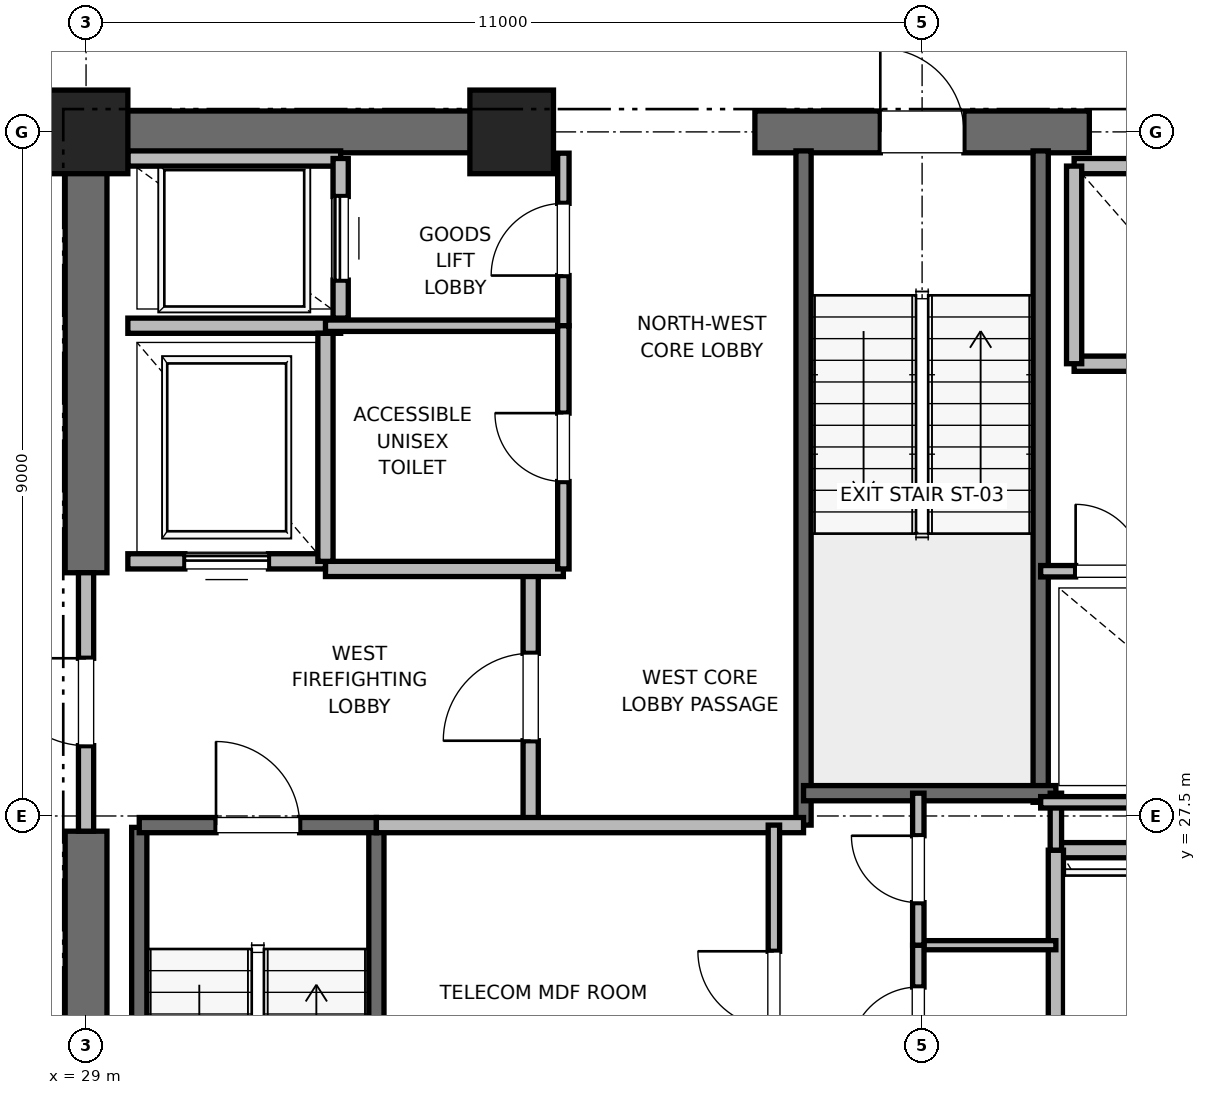
"""IFC4 building model, lengths in metres.
Left out: names, types, materials, properties, quantities, classifications, styles, units other than length and angle.
Written with IfcOpenShell. Run it as: python <this file> out.ifc"""

import sys

from ifc_helpers import new_model, si_unit, direction, frame, frame_2d, origin, origin_2d, place, context, subcontext, project, spatial, rectangle, extrude, element, fill, save


model = new_model("IFC4")
c1 = context("Model", 3, precision=1e-05, world=origin(), true_north=direction((0.0, 1.0)))
c2 = subcontext(c1, "Body", "Model", "MODEL_VIEW")
j1 = project(units=[si_unit("LENGTHUNIT", "METRE"), si_unit("PLANEANGLEUNIT", "RADIAN")], contexts=[c1])
p1 = place(None, origin())
s1 = spatial("IfcSite", under=j1, at=p1, CompositionType="ELEMENT")
p2 = place(p1, origin())
s2 = spatial("IfcBuilding", under=s1, at=p2, CompositionType="ELEMENT")
p3 = place(p2, frame((0.0, 0.0, 180.4)))
s3 = spatial("IfcBuildingStorey", under=s2, at=p3, CompositionType="ELEMENT", Elevation=180.4)
for number, where, z_axis, x_axis in (
    (1, (29.0, 36.5, 0.0), (0.0, 0.0, 1.0), (1.0, 0.0, 0.0)),
    (2, (34.6, 36.5, 0.0), (0.0, 0.0, 1.0), (1.0, 0.0, 0.0)),
):
    element("IfcColumn", number, at=place(p3, frame(where, z_axis=z_axis, x_axis=x_axis)), inside=s3, PredefinedType="PILASTER", context=c2, shape_type="SweptSolid", body=[
        extrude(rectangle(XDim=1.1, YDim=1.1, at=origin_2d()), origin(), (0.0, 0.0, 1.0), 4.0),
    ])
p4 = place(p3, frame((29.0, 36.5, 0.0), z_axis=(0.0, 0.0, 1.0), x_axis=(1.0, 0.0, 0.0)))
e3 = element("IfcWall", 3, at=p4, inside=s3, PredefinedType="SHEAR", context=c2, shape_type="SweptSolid", body=[
    extrude(rectangle(XDim=5.8, YDim=0.55, at=frame_2d((2.9, 0.0))), origin(), (0.0, 0.0, 1.0), 3.7),
])
p5 = place(p3, frame((37.8, 36.5, 0.0), z_axis=(0.0, 0.0, 1.0), x_axis=(1.0, 0.0, 0.0)))
e4 = element("IfcWall", 4, at=p5, inside=s3, PredefinedType="SHEAR", context=c2, shape_type="SweptSolid", body=[
    extrude(rectangle(XDim=4.4, YDim=0.55, at=frame_2d((2.2, 0.0))), origin(), (0.0, 0.0, 1.0), 3.7),
])
p6 = place(p5, frame((1.65, 0.0, 0.0)))
e5 = element("IfcOpeningElement", 5, at=p6, cuts=e4, PredefinedType="OPENING", context=c2, shape_type="SweptSolid", body=[
    extrude(rectangle(XDim=1.1, YDim=2.15, at=frame_2d((0.55, 1.075))), frame((0.0, 0.275, 0.0), z_axis=(0.0, -1.0, 0.0), x_axis=(1.0, 0.0, 0.0)), (0.0, 0.0, 1.0), 0.55),
])
p7 = place(p3, frame((29.0, 18.5, 0.0), z_axis=(0.0, 0.0, 1.0), x_axis=(0.0, 1.0, 0.0)))
e6 = element("IfcWall", 6, at=p7, inside=s3, PredefinedType="SHEAR", context=c2, shape_type="SweptSolid", body=[
    extrude(rectangle(XDim=8.8, YDim=0.55, at=frame_2d((4.4, 0.0))), origin(), (0.0, 0.0, 1.0), 3.7),
])
p8 = place(p3, frame((29.0, 30.7, 0.0), z_axis=(0.0, 0.0, 1.0), x_axis=(0.0, 1.0, 0.0)))
e7 = element("IfcWall", 7, at=p8, inside=s3, PredefinedType="SHEAR", context=c2, shape_type="SweptSolid", body=[
    extrude(rectangle(XDim=5.8, YDim=0.55, at=frame_2d((2.9, 0.0))), origin(), (0.0, 0.0, 1.0), 3.7),
])
p9 = place(p3, frame((29.7, 19.2, 0.0), z_axis=(0.0, 0.0, 1.0), x_axis=(0.0, 1.0, 0.0)))
e8 = element("IfcWall", 8, at=p9, inside=s3, PredefinedType="SOLIDWALL", context=c2, shape_type="SweptSolid", body=[
    extrude(rectangle(XDim=8.15, YDim=0.2, at=frame_2d((4.075, 0.0))), origin(), (0.0, 0.0, 1.0), 3.7),
])
p10 = place(p3, frame((32.82, 18.6, 0.0), z_axis=(0.0, 0.0, 1.0), x_axis=(0.0, 1.0, 0.0)))
e9 = element("IfcWall", 9, at=p10, inside=s3, PredefinedType="SOLIDWALL", context=c2, shape_type="SweptSolid", body=[
    extrude(rectangle(XDim=8.78, YDim=0.2, at=frame_2d((4.39, 0.0))), origin(), (0.0, 0.0, 1.0), 3.7),
])
p11 = place(p3, frame((29.7, 27.38, 0.0), z_axis=(0.0, 0.0, 1.0), x_axis=(1.0, 0.0, 0.0)))
e10 = element("IfcWall", 10, at=p11, inside=s3, PredefinedType="SOLIDWALL", context=c2, shape_type="SweptSolid", body=[
    extrude(rectangle(XDim=3.12, YDim=0.2, at=frame_2d((1.56, 0.0))), origin(), (0.0, 0.0, 1.0), 3.7),
])
p12 = place(p11, frame((1.01, 0.0, 0.0)))
e11 = element("IfcOpeningElement", 11, at=p12, cuts=e10, PredefinedType="OPENING", context=c2, shape_type="SweptSolid", body=[
    extrude(rectangle(XDim=1.1, YDim=2.15, at=frame_2d((0.55, 1.075))), frame((0.0, 0.1, 0.0), z_axis=(0.0, -1.0, 0.0), x_axis=(1.0, 0.0, 0.0)), (0.0, 0.0, 1.0), 0.2),
])
p13 = place(p3, frame((38.44, 27.38, 0.0), z_axis=(0.0, 0.0, 1.0), x_axis=(0.0, 1.0, 0.0)))
e12 = element("IfcWall", 12, at=p13, inside=s3, PredefinedType="SOLIDWALL", context=c2, shape_type="SweptSolid", body=[
    extrude(rectangle(XDim=8.87, YDim=0.2, at=frame_2d((4.435, 0.0))), origin(), (0.0, 0.0, 1.0), 3.7),
])
p14 = place(p3, frame((41.56, 27.68, 0.0), z_axis=(0.0, 0.0, 1.0), x_axis=(0.0, 1.0, 0.0)))
e13 = element("IfcWall", 13, at=p14, inside=s3, PredefinedType="SOLIDWALL", context=c2, shape_type="SweptSolid", body=[
    extrude(rectangle(XDim=8.57, YDim=0.2, at=frame_2d((4.285, 0.0))), origin(), (0.0, 0.0, 1.0), 3.7),
])
p15 = place(p3, frame((38.44, 27.8, 0.0), z_axis=(0.0, 0.0, 1.0), x_axis=(1.0, 0.0, 0.0)))
e14 = element("IfcWall", 14, at=p15, inside=s3, PredefinedType="SOLIDWALL", context=c2, shape_type="SweptSolid", body=[
    extrude(rectangle(XDim=3.32, YDim=0.2, at=frame_2d((1.66, 0.0))), origin(), (0.0, 0.0, 1.0), 3.7),
])
p16 = place(p3, frame((34.85, 27.38, 0.0), z_axis=(0.0, 0.0, 1.0), x_axis=(0.0, 1.0, 0.0)))
e15 = element("IfcWall", 15, at=p16, inside=s3, PredefinedType="PARTITIONING", context=c2, shape_type="SweptSolid", body=[
    extrude(rectangle(XDim=3.37, YDim=0.2, at=frame_2d((1.685, 0.0))), origin(), (0.0, 0.0, 1.0), 3.7),
])
p17 = place(p16, frame((1.11, 0.0, 0.0)))
e16 = element("IfcOpeningElement", 16, at=p17, cuts=e15, PredefinedType="OPENING", context=c2, shape_type="SweptSolid", body=[
    extrude(rectangle(XDim=1.15, YDim=2.2, at=frame_2d((0.575, 1.1))), frame((0.0, 0.1, 0.0), z_axis=(0.0, -1.0, 0.0), x_axis=(1.0, 0.0, 0.0)), (0.0, 0.0, 1.0), 0.2),
])
p18 = place(p3, frame((29.0, 27.3, 0.0), z_axis=(0.0, 0.0, 1.0), x_axis=(0.0, 1.0, 0.0)))
e17 = element("IfcWall", 17, at=p18, inside=s3, PredefinedType="PARTITIONING", context=c2, shape_type="SweptSolid", body=[
    extrude(rectangle(XDim=3.4, YDim=0.2, at=frame_2d((1.7, 0.0))), origin(), (0.0, 0.0, 1.0), 2.68),
])
p19 = place(p18, frame((1.125, 0.0, 0.0)))
e18 = element("IfcOpeningElement", 18, at=p19, cuts=e17, PredefinedType="OPENING", context=c2, shape_type="SweptSolid", body=[
    extrude(rectangle(XDim=1.15, YDim=2.2, at=frame_2d((0.575, 1.1))), frame((0.0, 0.1, 0.0), z_axis=(0.0, -1.0, 0.0), x_axis=(1.0, 0.0, 0.0)), (0.0, 0.0, 1.0), 0.2),
])
p20 = place(p3, frame((32.82, 27.38, 0.0), z_axis=(0.0, 0.0, 1.0), x_axis=(1.0, 0.0, 0.0)))
e19 = element("IfcWall", 19, at=p20, inside=s3, PredefinedType="PARTITIONING", context=c2, shape_type="SweptSolid", body=[
    extrude(rectangle(XDim=5.62, YDim=0.2, at=frame_2d((2.81, 0.0))), origin(), (0.0, 0.0, 1.0), 3.7),
])
p21 = place(p3, frame((32.15, 30.75, 0.0), z_axis=(0.0, 0.0, 1.0), x_axis=(1.0, 0.0, 0.0)))
e20 = element("IfcWall", 20, at=p21, inside=s3, PredefinedType="PARTITIONING", context=c2, shape_type="SweptSolid", body=[
    extrude(rectangle(XDim=3.13, YDim=0.2, at=frame_2d((1.565, 0.0))), origin(), (0.0, 0.0, 1.0), 3.7),
])
p22 = place(p3, frame((29.55, 30.85, 0.0), z_axis=(0.0, 0.0, 1.0), x_axis=(1.0, 0.0, 0.0)))
e21 = element("IfcWall", 21, at=p22, inside=s3, PredefinedType="SOLIDWALL", context=c2, shape_type="SweptSolid", body=[
    extrude(rectangle(XDim=2.6, YDim=0.2, at=frame_2d((1.3, 0.0))), origin(), (0.0, 0.0, 1.0), 2.68),
])
p23 = place(p22, frame((0.75, 0.0, 0.0)))
e22 = element("IfcOpeningElement", 22, at=p23, cuts=e21, PredefinedType="OPENING", context=c2, shape_type="SweptSolid", body=[
    extrude(rectangle(XDim=1.1, YDim=2.2, at=frame_2d((0.55, 1.1))), frame((0.0, 0.1, 0.0), z_axis=(0.0, -1.0, 0.0), x_axis=(1.0, 0.0, 0.0)), (0.0, 0.0, 1.0), 0.2),
])
p24 = place(p3, frame((29.55, 33.95, 0.0), z_axis=(0.0, 0.0, 1.0), x_axis=(1.0, 0.0, 0.0)))
e23 = element("IfcWall", 23, at=p24, inside=s3, PredefinedType="SOLIDWALL", context=c2, shape_type="SweptSolid", body=[
    extrude(rectangle(XDim=2.8, YDim=0.2, at=frame_2d((1.4, 0.0))), origin(), (0.0, 0.0, 1.0), 3.7),
])
p25 = place(p3, frame((32.15, 30.85, 0.0), z_axis=(0.0, 0.0, 1.0), x_axis=(0.0, 1.0, 0.0)))
e24 = element("IfcWall", 24, at=p25, inside=s3, PredefinedType="SOLIDWALL", context=c2, shape_type="SweptSolid", body=[
    extrude(rectangle(XDim=3.0, YDim=0.2, at=frame_2d((1.5, 0.0))), origin(), (0.0, 0.0, 1.0), 3.7),
])
p26 = place(p3, frame((32.35, 36.15, 0.0), z_axis=(0.0, 0.0, 1.0), x_axis=(-1.0, 0.0, 0.0)))
e25 = element("IfcWall", 25, at=p26, inside=s3, PredefinedType="SOLIDWALL", context=c2, shape_type="SweptSolid", body=[
    extrude(rectangle(XDim=2.8, YDim=0.2, at=frame_2d((1.4, 0.0))), origin(), (0.0, 0.0, 1.0), 2.91),
])
p27 = place(p3, frame((32.35, 34.05, 0.0), z_axis=(0.0, 0.0, 1.0), x_axis=(0.0, 1.0, 0.0)))
e26 = element("IfcWall", 26, at=p27, inside=s3, PredefinedType="SOLIDWALL", context=c2, shape_type="SweptSolid", body=[
    extrude(rectangle(XDim=2.1, YDim=0.2, at=frame_2d((1.05, 0.0))), origin(), (0.0, 0.0, 1.0), 3.7),
])
p28 = place(p27, frame((0.5, 0.0, 0.0)))
e27 = element("IfcOpeningElement", 27, at=p28, cuts=e26, PredefinedType="OPENING", context=c2, shape_type="SweptSolid", body=[
    extrude(rectangle(XDim=1.1, YDim=2.2, at=frame_2d((0.55, 1.1))), frame((0.0, 0.1, 0.0), z_axis=(0.0, -1.0, 0.0), x_axis=(1.0, 0.0, 0.0)), (0.0, 0.0, 1.0), 0.2),
])
p29 = place(p3, frame((43.44, 27.05, 0.0), z_axis=(0.0, 0.0, 1.0), x_axis=(-1.0, 0.0, 0.0)))
e28 = element("IfcWall", 28, at=p29, inside=s3, PredefinedType="SOLIDWALL", context=c2, shape_type="SweptSolid", body=[
    extrude(rectangle(XDim=1.68, YDim=0.2, at=frame_2d((0.84, 0.0))), origin(), (0.0, 0.0, 1.0), 3.7),
])
p30 = place(p3, frame((41.76, 27.05, 0.0), z_axis=(0.0, 0.0, 1.0), x_axis=(0.0, -1.0, 0.0)))
e29 = element("IfcWall", 29, at=p30, inside=s3, PredefinedType="SOLIDWALL", context=c2, shape_type="SweptSolid", body=[
    extrude(rectangle(XDim=2.6, YDim=0.2, at=frame_2d((1.3, 0.0))), origin(), (0.0, 0.0, 1.0), 3.7),
])
p31 = place(p3, frame((42.0, 33.45, 0.0), z_axis=(0.0, 0.0, 1.0), x_axis=(1.0, 0.0, 0.0)))
e30 = element("IfcWall", 30, at=p31, inside=s3, PredefinedType="SOLIDWALL", context=c2, shape_type="SweptSolid", body=[
    extrude(rectangle(XDim=2.3, YDim=0.2, at=frame_2d((1.15, 0.0))), origin(), (0.0, 0.0, 1.0), 3.7),
])
p32 = place(p3, frame((44.3, 36.05, 0.0), z_axis=(0.0, 0.0, 1.0), x_axis=(-1.0, 0.0, 0.0)))
e31 = element("IfcWall", 31, at=p32, inside=s3, PredefinedType="SOLIDWALL", context=c2, shape_type="SweptSolid", body=[
    extrude(rectangle(XDim=2.3, YDim=0.2, at=frame_2d((1.15, 0.0))), origin(), (0.0, 0.0, 1.0), 2.68),
])
p33 = place(p3, frame((42.0, 36.05, 0.0), z_axis=(0.0, 0.0, 1.0), x_axis=(0.0, -1.0, 0.0)))
e32 = element("IfcWall", 32, at=p33, inside=s3, PredefinedType="SOLIDWALL", context=c2, shape_type="SweptSolid", body=[
    extrude(rectangle(XDim=2.6, YDim=0.2, at=frame_2d((1.3, 0.0))), origin(), (0.0, 0.0, 1.0), 2.68),
])
p34 = place(p3, frame((39.95, 25.8, 0.0), z_axis=(0.0, 0.0, 1.0), x_axis=(1.0, 0.0, 0.0)))
e33 = element("IfcWall", 33, at=p34, inside=s3, PredefinedType="PARTITIONING", context=c2, shape_type="SweptSolid", body=[
    extrude(rectangle(XDim=1.81, YDim=0.12, at=frame_2d((0.905, 0.0))), origin(), (0.0, 0.0, 1.0), 2.85),
])
p35 = place(p3, frame((41.76, 27.05, 0.0), z_axis=(0.0, 0.0, 1.0), x_axis=(0.0, 1.0, 0.0)))
e34 = element("IfcWall", 34, at=p35, inside=s3, PredefinedType="PARTITIONING", context=c2, shape_type="SweptSolid", body=[
    extrude(rectangle(XDim=0.75, YDim=0.15, at=frame_2d((0.375, 0.0))), origin(), (0.0, 0.0, 1.0), 2.85),
])
p36 = place(p3, frame((39.95, 23.8, 0.0), z_axis=(0.0, 0.0, 1.0), x_axis=(0.0, 1.0, 0.0)))
e35 = element("IfcWall", 35, at=p36, inside=s3, PredefinedType="PARTITIONING", context=c2, shape_type="SweptSolid", body=[
    extrude(rectangle(XDim=2.0, YDim=0.15, at=frame_2d((1.0, 0.0))), origin(), (0.0, 0.0, 1.0), 2.85),
])
p37 = place(p36, frame((0.55, 0.0, 0.0)))
e36 = element("IfcOpeningElement", 36, at=p37, cuts=e35, PredefinedType="OPENING", context=c2, shape_type="SweptSolid", body=[
    extrude(rectangle(XDim=0.9, YDim=2.1, at=frame_2d((0.45, 1.05))), frame((0.0, 0.075, 0.0), z_axis=(0.0, -1.0, 0.0), x_axis=(1.0, 0.0, 0.0)), (0.0, 0.0, 1.0), 0.15),
])
p38 = place(p3, frame((39.95, 25.8, 0.0), z_axis=(0.0, 0.0, 1.0), x_axis=(0.0, 1.0, 0.0)))
e37 = element("IfcWall", 37, at=p38, inside=s3, PredefinedType="PARTITIONING", context=c2, shape_type="SweptSolid", body=[
    extrude(rectangle(XDim=2.0, YDim=0.15, at=frame_2d((1.0, 0.0))), origin(), (0.0, 0.0, 1.0), 2.85),
])
p39 = place(p38, frame((0.56, 0.0, 0.0)))
e38 = element("IfcOpeningElement", 38, at=p39, cuts=e37, PredefinedType="OPENING", context=c2, shape_type="SweptSolid", body=[
    extrude(rectangle(XDim=0.88, YDim=2.1, at=frame_2d((0.44, 1.05))), frame((0.0, 0.075, 0.0), z_axis=(0.0, -1.0, 0.0), x_axis=(1.0, 0.0, 0.0)), (0.0, 0.0, 1.0), 0.15),
])
p40 = place(p3, frame((32.15, 33.95, 0.0), z_axis=(0.0, 0.0, 1.0), x_axis=(1.0, 0.0, 0.0)))
e39 = element("IfcWall", 39, at=p40, inside=s3, PredefinedType="PARTITIONING", context=c2, shape_type="SweptSolid", body=[
    extrude(rectangle(XDim=3.13, YDim=0.15, at=frame_2d((1.565, 0.0))), origin(), (0.0, 0.0, 1.0), 2.85),
])
p41 = place(p3, frame((35.28, 33.95, 0.0), z_axis=(0.0, 0.0, 1.0), x_axis=(0.0, 1.0, 0.0)))
e40 = element("IfcWall", 40, at=p41, inside=s3, PredefinedType="PARTITIONING", context=c2, shape_type="SweptSolid", body=[
    extrude(rectangle(XDim=2.27, YDim=0.15, at=frame_2d((1.135, 0.0))), origin(), (0.0, 0.0, 1.0), 2.68),
])
p42 = place(p41, frame((0.66, 0.0, 0.0)))
e41 = element("IfcOpeningElement", 41, at=p42, cuts=e40, PredefinedType="OPENING", context=c2, shape_type="SweptSolid", body=[
    extrude(rectangle(XDim=0.95, YDim=2.15, at=frame_2d((0.475, 1.075))), frame((0.0, 0.075, 0.0), z_axis=(0.0, -1.0, 0.0), x_axis=(1.0, 0.0, 0.0)), (0.0, 0.0, 1.0), 0.15),
])
p43 = place(p3, frame((35.28, 30.75, 0.0), z_axis=(0.0, 0.0, 1.0), x_axis=(0.0, 1.0, 0.0)))
e42 = element("IfcWall", 42, at=p43, inside=s3, PredefinedType="PARTITIONING", context=c2, shape_type="SweptSolid", body=[
    extrude(rectangle(XDim=3.2, YDim=0.15, at=frame_2d((1.6, 0.0))), origin(), (0.0, 0.0, 1.0), 2.85),
])
p44 = place(p43, frame((1.15, 0.0, 0.0)))
e43 = element("IfcOpeningElement", 43, at=p44, cuts=e42, PredefinedType="OPENING", context=c2, shape_type="SweptSolid", body=[
    extrude(rectangle(XDim=0.9, YDim=2.1, at=frame_2d((0.45, 1.05))), frame((0.0, 0.075, 0.0), z_axis=(0.0, -1.0, 0.0), x_axis=(1.0, 0.0, 0.0)), (0.0, 0.0, 1.0), 0.15),
])
p45 = place(p3, frame((38.05, 23.06, 0.0), z_axis=(0.0, 0.0, 1.0), x_axis=(0.0, 1.0, 0.0)))
e44 = element("IfcWall", 44, at=p45, inside=s3, PredefinedType="PARTITIONING", context=c2, shape_type="SweptSolid", body=[
    extrude(rectangle(XDim=4.32, YDim=0.15, at=frame_2d((2.16, 0.0))), origin(), (0.0, 0.0, 1.0), 2.85),
])
p46 = place(p45, frame((1.66, 0.0, 0.0)))
e45 = element("IfcOpeningElement", 45, at=p46, cuts=e44, PredefinedType="OPENING", context=c2, shape_type="SweptSolid", body=[
    extrude(rectangle(XDim=1.0, YDim=2.15, at=frame_2d((0.5, 1.075))), frame((0.0, 0.075, 0.0), z_axis=(0.0, -1.0, 0.0), x_axis=(1.0, 0.0, 0.0)), (0.0, 0.0, 1.0), 0.15),
])
p47 = place(p3, frame((41.56, 27.68, 0.0), z_axis=(0.0, 0.0, 1.0), x_axis=(1.0, 0.0, 0.0)))
e46 = element("IfcWall", 46, at=p47, inside=s3, PredefinedType="PARTITIONING", context=c2, shape_type="SweptSolid", body=[
    extrude(rectangle(XDim=3.59, YDim=0.15, at=frame_2d((1.795, 0.0))), origin(), (0.0, 0.0, 1.0), 2.85),
])
p48 = place(p3, frame((41.56, 30.72, 0.0), z_axis=(0.0, 0.0, 1.0), x_axis=(1.0, 0.0, 0.0)))
e47 = element("IfcWall", 47, at=p48, inside=s3, PredefinedType="PARTITIONING", context=c2, shape_type="SweptSolid", body=[
    extrude(rectangle(XDim=1.8, YDim=0.15, at=frame_2d((0.9, 0.0))), origin(), (0.0, 0.0, 1.0), 2.85),
])
p49 = place(p48, frame((0.46, 0.0, 0.0)))
e48 = element("IfcOpeningElement", 48, at=p49, cuts=e47, PredefinedType="OPENING", context=c2, shape_type="SweptSolid", body=[
    extrude(rectangle(XDim=0.88, YDim=2.1, at=frame_2d((0.44, 1.05))), frame((0.0, 0.075, 0.0), z_axis=(0.0, -1.0, 0.0), x_axis=(1.0, 0.0, 0.0)), (0.0, 0.0, 1.0), 0.15),
])
p50 = place(p12, origin())
e49 = element("IfcDoor", 49, at=p50, inside=s3, OperationType="SINGLE_SWING_LEFT", PredefinedType="DOOR", context=c2, shape_type="SweptSolid", body=[
    extrude(rectangle(XDim=1.1, YDim=2.15, at=frame_2d((0.55, 1.075))), frame((0.0, 0.025, 0.0), z_axis=(0.0, -1.0, 0.0), x_axis=(1.0, 0.0, 0.0)), (0.0, 0.0, 1.0), 0.05),
])
fill(e11, e49)
p51 = place(p6, origin())
e50 = element("IfcDoor", 50, at=p51, inside=s3, OperationType="SINGLE_SWING_LEFT", PredefinedType="DOOR", context=c2, shape_type="SweptSolid", body=[
    extrude(rectangle(XDim=1.1, YDim=2.15, at=frame_2d((0.55, 1.075))), frame((0.0, 0.025, 0.0), z_axis=(0.0, -1.0, 0.0), x_axis=(1.0, 0.0, 0.0)), (0.0, 0.0, 1.0), 0.05),
])
fill(e5, e50)
p52 = place(p17, origin())
e51 = element("IfcDoor", 51, at=p52, inside=s3, OperationType="SINGLE_SWING_LEFT", PredefinedType="DOOR", context=c2, shape_type="SweptSolid", body=[
    extrude(rectangle(XDim=1.15, YDim=2.2, at=frame_2d((0.575, 1.1))), frame((0.0, 0.025, 0.0), z_axis=(0.0, -1.0, 0.0), x_axis=(1.0, 0.0, 0.0)), (0.0, 0.0, 1.0), 0.05),
])
fill(e16, e51)
p53 = place(p19, origin())
e52 = element("IfcDoor", 52, at=p53, inside=s3, OperationType="SINGLE_SWING_RIGHT", PredefinedType="DOOR", context=c2, shape_type="SweptSolid", body=[
    extrude(rectangle(XDim=1.15, YDim=2.2, at=frame_2d((0.575, 1.1))), frame((0.0, 0.025, 0.0), z_axis=(0.0, -1.0, 0.0), x_axis=(1.0, 0.0, 0.0)), (0.0, 0.0, 1.0), 0.05),
])
fill(e18, e52)
p54 = place(p23, origin())
e53 = element("IfcDoor", 53, at=p54, inside=s3, OperationType="SLIDING_TO_RIGHT", PredefinedType="DOOR", context=c2, shape_type="SweptSolid", body=[
    extrude(rectangle(XDim=1.1, YDim=2.2, at=frame_2d((0.55, 1.1))), frame((0.0, 0.025, 0.0), z_axis=(0.0, -1.0, 0.0), x_axis=(1.0, 0.0, 0.0)), (0.0, 0.0, 1.0), 0.05),
])
fill(e22, e53)
p55 = place(p28, origin())
e54 = element("IfcDoor", 54, at=p55, inside=s3, OperationType="SLIDING_TO_RIGHT", PredefinedType="DOOR", context=c2, shape_type="SweptSolid", body=[
    extrude(rectangle(XDim=1.1, YDim=2.2, at=frame_2d((0.55, 1.1))), frame((0.0, 0.025, 0.0), z_axis=(0.0, -1.0, 0.0), x_axis=(1.0, 0.0, 0.0)), (0.0, 0.0, 1.0), 0.05),
])
fill(e27, e54)
p56 = place(p37, origin())
e55 = element("IfcDoor", 55, at=p56, inside=s3, OperationType="SINGLE_SWING_LEFT", PredefinedType="DOOR", context=c2, shape_type="SweptSolid", body=[
    extrude(rectangle(XDim=0.9, YDim=2.1, at=frame_2d((0.45, 1.05))), frame((0.0, 0.025, 0.0), z_axis=(0.0, -1.0, 0.0), x_axis=(1.0, 0.0, 0.0)), (0.0, 0.0, 1.0), 0.05),
])
fill(e36, e55)
p57 = place(p39, origin())
e56 = element("IfcDoor", 56, at=p57, inside=s3, OperationType="SINGLE_SWING_RIGHT", PredefinedType="DOOR", context=c2, shape_type="SweptSolid", body=[
    extrude(rectangle(XDim=0.88, YDim=2.1, at=frame_2d((0.44, 1.05))), frame((0.0, 0.025, 0.0), z_axis=(0.0, -1.0, 0.0), x_axis=(1.0, 0.0, 0.0)), (0.0, 0.0, 1.0), 0.05),
])
fill(e38, e56)
p58 = place(p42, origin())
e57 = element("IfcDoor", 57, at=p58, inside=s3, OperationType="SINGLE_SWING_LEFT", PredefinedType="DOOR", context=c2, shape_type="SweptSolid", body=[
    extrude(rectangle(XDim=0.95, YDim=2.15, at=frame_2d((0.475, 1.075))), frame((0.0, 0.025, 0.0), z_axis=(0.0, -1.0, 0.0), x_axis=(1.0, 0.0, 0.0)), (0.0, 0.0, 1.0), 0.05),
])
fill(e41, e57)
p59 = place(p44, origin())
e58 = element("IfcDoor", 58, at=p59, inside=s3, OperationType="SINGLE_SWING_RIGHT", PredefinedType="DOOR", context=c2, shape_type="SweptSolid", body=[
    extrude(rectangle(XDim=0.9, YDim=2.1, at=frame_2d((0.45, 1.05))), frame((0.0, 0.025, 0.0), z_axis=(0.0, -1.0, 0.0), x_axis=(1.0, 0.0, 0.0)), (0.0, 0.0, 1.0), 0.05),
])
fill(e43, e58)
p60 = place(p46, origin())
e59 = element("IfcDoor", 59, at=p60, inside=s3, OperationType="SINGLE_SWING_RIGHT", PredefinedType="DOOR", context=c2, shape_type="SweptSolid", body=[
    extrude(rectangle(XDim=1.0, YDim=2.15, at=frame_2d((0.5, 1.075))), frame((0.0, 0.025, 0.0), z_axis=(0.0, -1.0, 0.0), x_axis=(1.0, 0.0, 0.0)), (0.0, 0.0, 1.0), 0.05),
])
fill(e45, e59)
p61 = place(p49, origin())
e60 = element("IfcDoor", 60, at=p61, inside=s3, OperationType="SINGLE_SWING_LEFT", PredefinedType="DOOR", context=c2, shape_type="SweptSolid", body=[
    extrude(rectangle(XDim=0.88, YDim=2.1, at=frame_2d((0.44, 1.05))), frame((0.0, 0.025, 0.0), z_axis=(0.0, -1.0, 0.0), x_axis=(1.0, 0.0, 0.0)), (0.0, 0.0, 1.0), 0.05),
])
fill(e48, e60)
save(model, sys.argv[1])
